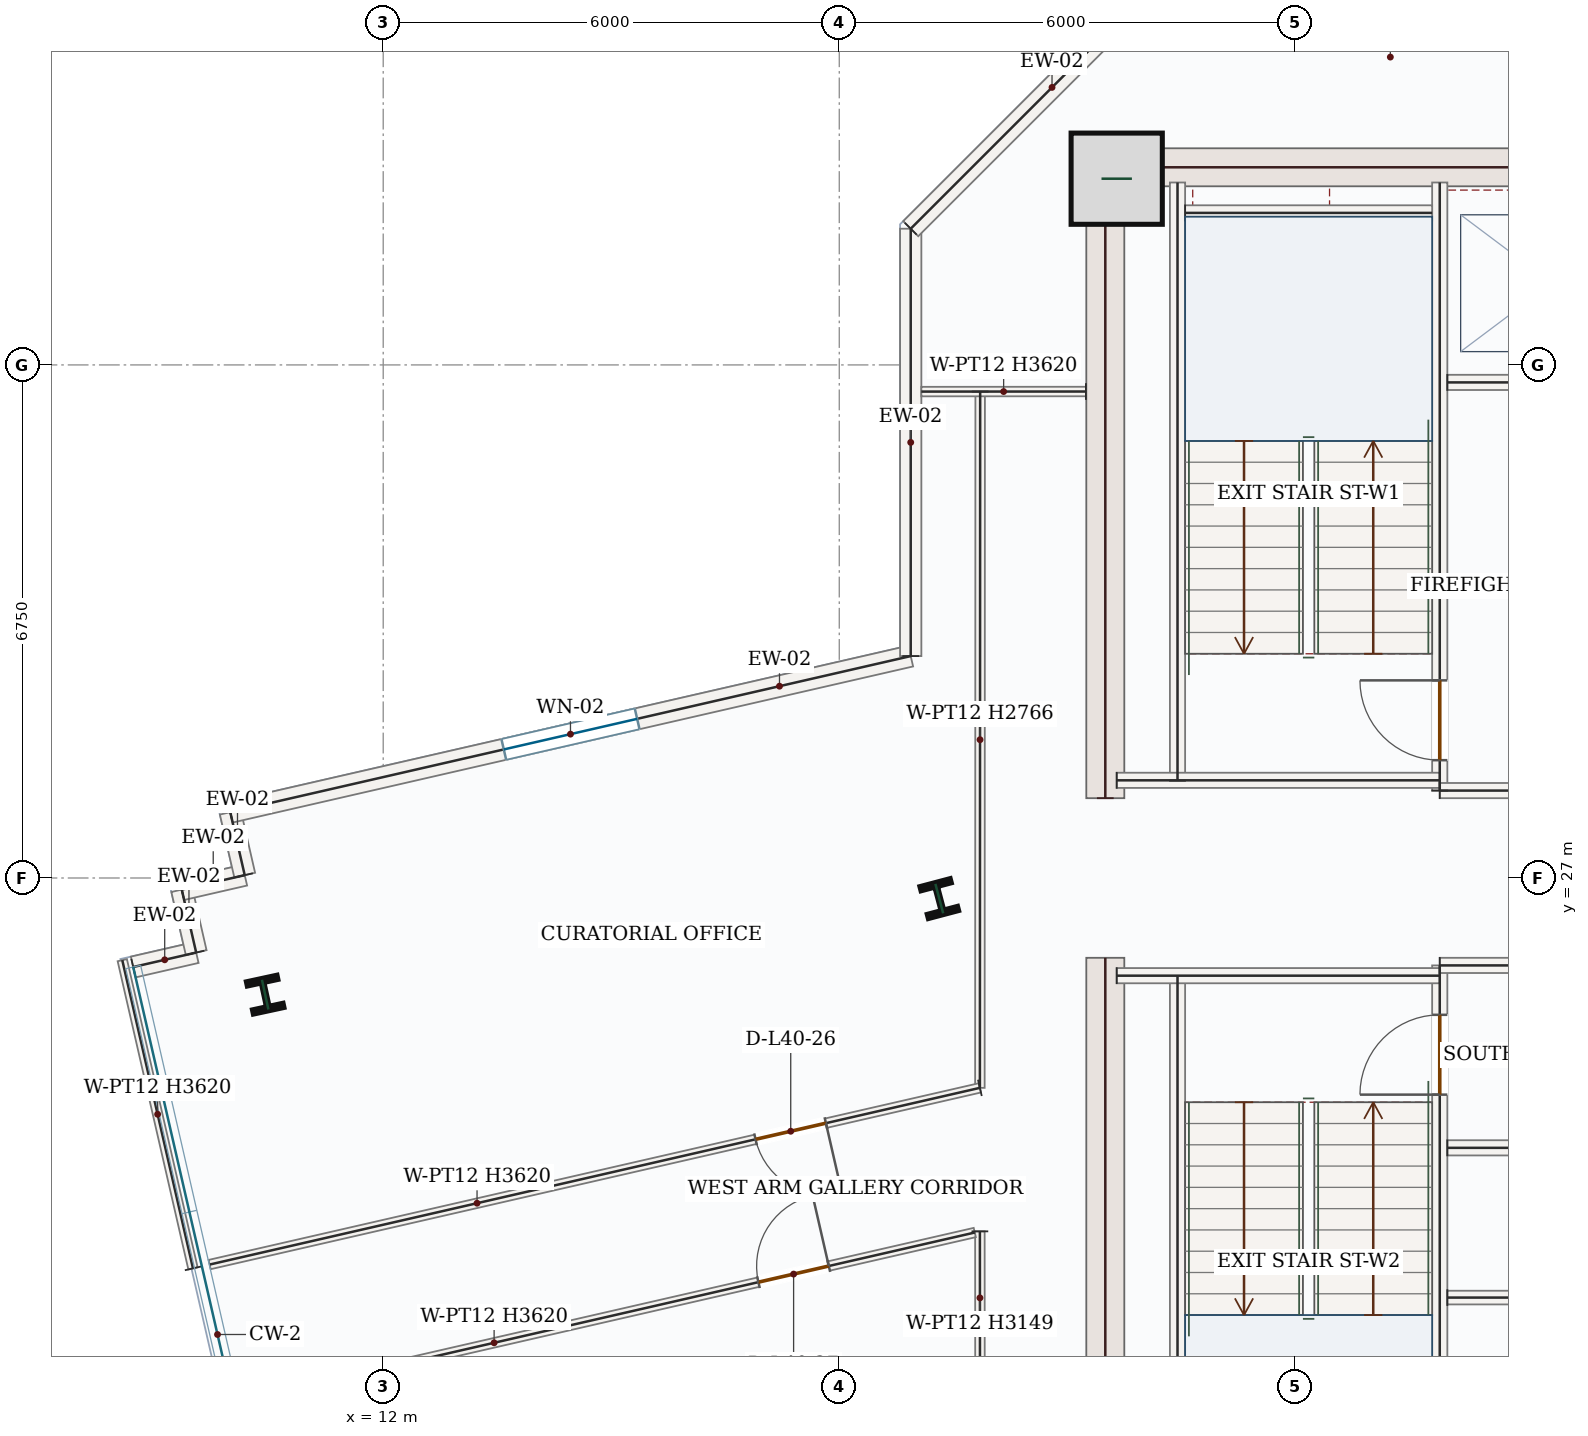
"""IFC4 building model, lengths in metres.
Left out: names, types, materials, properties, quantities, classifications, styles, units other than length and angle.
Written with IfcOpenShell. Run it as: python <this file> out.ifc"""

import sys

from ifc_helpers import new_model, si_unit, direction, frame, frame_2d, origin, origin_2d, place, context, subcontext, project, spatial, rectangle, i_section, extrude, source, transform, mapped, element, fill, save


model = new_model("IFC4")
c1 = context("Model", 3, precision=1e-05, world=origin(), true_north=direction((0.0, 1.0)))
c2 = subcontext(c1, "Body", "Model", "MODEL_VIEW")
j1 = project(units=[si_unit("LENGTHUNIT", "METRE"), si_unit("PLANEANGLEUNIT", "RADIAN")], contexts=[c1])
p1 = place(None, origin())
s1 = spatial("IfcSite", under=j1, at=p1, CompositionType="ELEMENT")
p2 = place(p1, origin())
s2 = spatial("IfcBuilding", under=s1, at=p2, CompositionType="ELEMENT")
p3 = place(p2, frame((0.0, 0.0, 174.6)))
s3 = spatial("IfcBuildingStorey", under=s2, at=p3, CompositionType="ELEMENT", Elevation=174.6)
m1 = source(origin(), c2, "Body", "SweptSolid", [
    extrude(rectangle(XDim=8.55, YDim=0.5, at=frame_2d((4.275, 0.0))), origin(), (0.0, 0.0, 1.0), 3.62),
])
for number, where, z_axis, x_axis in (
    (1, (21.5, 17.4, 0.0), (0.0, 0.0, 1.0), (0.0, 1.0, 0.0)),
    (2, (21.5, 28.05, 0.0), (0.0, 0.0, 1.0), (0.0, 1.0, 0.0)),
):
    element("IfcWall", number, at=place(p3, frame(where, z_axis=z_axis, x_axis=x_axis)), inside=s3, PredefinedType="SHEAR", context=c2, shape_type="MappedRepresentation", body=[
        mapped(m1, transform((0.0, 0.0, 0.0), x_axis=(1.0, 0.0, 0.0), y_axis=(0.0, 1.0, 0.0), z_axis=(0.0, 0.0, 1.0), scale=1.0)),
    ])
m2 = source(origin(), c2, "Body", "SweptSolid", [
    extrude(rectangle(XDim=7.0, YDim=0.5, at=frame_2d((3.5, 0.0))), origin(), (0.0, 0.0, 1.0), 3.62),
])
p4 = place(p3, frame((21.75, 36.35, 0.0), z_axis=(0.0, 0.0, 1.0), x_axis=(1.0, 0.0, 0.0)))
e3 = element("IfcWall", 3, at=p4, inside=s3, PredefinedType="SHEAR", context=c2, shape_type="MappedRepresentation", body=[
    mapped(m2, transform((0.0, 0.0, 0.0), x_axis=(1.0, 0.0, 0.0), y_axis=(0.0, 1.0, 0.0), z_axis=(0.0, 0.0, 1.0), scale=1.0)),
])
m3 = source(origin(), c2, "Body", "SweptSolid", [
    extrude(rectangle(XDim=1.2, YDim=1.2, at=origin_2d()), origin(), (0.0, 0.0, 1.0), 3.9),
])
p5 = place(p3, frame((21.65, 36.2, 0.0), z_axis=(0.0, 0.0, 1.0), x_axis=(1.0, 0.0, 0.0)))
e4 = element("IfcColumn", 4, at=p5, inside=s3, PredefinedType="COLUMN", context=c2, shape_type="MappedRepresentation", body=[
    mapped(m3, transform((0.0, 0.0, 0.0), x_axis=(1.0, 0.0, 0.0), y_axis=(0.0, 1.0, 0.0), z_axis=(0.0, 0.0, 1.0), scale=1.0)),
])
m4 = source(origin(), c2, "Body", "SweptSolid", [
    extrude(i_section(OverallWidth=0.412, OverallDepth=0.435, WebThickness=0.036, FlangeThickness=0.057, FilletRadius=0.018, at=origin_2d()), origin(), (0.0, 0.0, 1.0), 3.9),
])
for number, where, z_axis, x_axis in (
    (5, (19.316, 26.729, 0.0), (0.0, 0.0, 1.0), (0.967, 0.255, 0.0)),
    (6, (10.447, 25.465, 0.0), (0.0, 0.0, 1.0), (0.977, 0.211, 0.0)),
):
    element("IfcColumn", number, at=place(p3, frame(where, z_axis=z_axis, x_axis=x_axis)), inside=s3, PredefinedType="COLUMN", context=c2, shape_type="MappedRepresentation", body=[
        mapped(m4, transform((0.0, 0.0, 0.0), x_axis=(1.0, 0.0, 0.0), y_axis=(0.0, 1.0, 0.0), z_axis=(0.0, 0.0, 1.0), scale=1.0)),
    ])
m5 = source(origin(), c2, "Body", "SweptSolid", [
    extrude(rectangle(XDim=0.85, YDim=0.28, at=frame_2d((0.425, 0.0))), origin(), (0.0, 0.0, 1.0), 3.62),
])
p6 = place(p3, frame((8.711, 25.829, 0.0), z_axis=(0.0, 0.0, 1.0), x_axis=(0.974704946586, 0.223495563939, 0.0)))
e7 = element("IfcWall", 7, at=p6, inside=s3, PredefinedType="SOLIDWALL", context=c2, shape_type="MappedRepresentation", body=[
    mapped(m5, transform((0.0, 0.0, 0.0), x_axis=(1.0, 0.0, 0.0), y_axis=(0.0, 1.0, 0.0), z_axis=(0.0, 0.0, 1.0), scale=1.0)),
])
m6 = source(origin(), c2, "Body", "SweptSolid", [
    extrude(rectangle(XDim=0.85, YDim=0.28, at=frame_2d((0.425, 0.0))), origin(), (0.0, 0.0, 1.0), 3.62),
])
p7 = place(p3, frame((9.539, 26.019, 0.0), z_axis=(0.0, 0.0, 1.0), x_axis=(-0.22316012353, 0.974781800849, 0.0)))
e8 = element("IfcWall", 8, at=p7, inside=s3, PredefinedType="SOLIDWALL", context=c2, shape_type="MappedRepresentation", body=[
    mapped(m6, transform((0.0, 0.0, 0.0), x_axis=(1.0, 0.0, 0.0), y_axis=(0.0, 1.0, 0.0), z_axis=(0.0, 0.0, 1.0), scale=1.0)),
])
for number, where, z_axis, x_axis in (
    (9, (9.35, 26.847, 0.0), (0.0, 0.0, 1.0), (0.975, 0.223, 0.0)),
    (10, (10.178, 27.037, 0.0), (0.0, 0.0, 1.0), (-0.224, 0.975, 0.0)),
):
    element("IfcWall", number, at=place(p3, frame(where, z_axis=z_axis, x_axis=x_axis)), inside=s3, PredefinedType="SOLIDWALL", context=c2, shape_type="MappedRepresentation", body=[
        mapped(m5, transform((0.0, 0.0, 0.0), x_axis=(1.0, 0.0, 0.0), y_axis=(0.0, 1.0, 0.0), z_axis=(0.0, 0.0, 1.0), scale=1.0)),
    ])
p8 = place(p3, frame((9.988, 27.866, 0.0), z_axis=(0.0, 0.0, 1.0), x_axis=(0.974680686557, 0.223601340005, 0.0)))
e11 = element("IfcWall", 11, at=p8, inside=s3, PredefinedType="SOLIDWALL", context=c2, shape_type="SweptSolid", body=[
    extrude(rectangle(XDim=9.185, YDim=0.28, at=frame_2d((4.592, 0.0))), origin(), (0.0, 0.0, 1.0), 3.62),
])
p9 = place(p8, frame((3.692, 0.0, 0.85)))
e12 = element("IfcOpeningElement", 12, at=p9, cuts=e11, PredefinedType="OPENING", context=c2, shape_type="SweptSolid", body=[
    extrude(rectangle(XDim=1.8, YDim=1.75, at=frame_2d((0.9, 0.875))), frame((0.0, 0.15, 0.0), z_axis=(0.0, -1.0, 0.0), x_axis=(1.0, 0.0, 0.0)), (0.0, 0.0, 1.0), 0.3),
])
m7 = source(origin(), c2, "Body", "SweptSolid", [
    extrude(rectangle(XDim=5.623, YDim=0.28, at=frame_2d((2.811, 0.0))), origin(), (0.0, 0.0, 1.0), 3.62),
])
p10 = place(p3, frame((18.94, 29.919, 0.0), z_axis=(0.0, 0.0, 1.0), x_axis=(0.0, 1.0, 0.0)))
e13 = element("IfcWall", 13, at=p10, inside=s3, PredefinedType="SOLIDWALL", context=c2, shape_type="MappedRepresentation", body=[
    mapped(m7, transform((0.0, 0.0, 0.0), x_axis=(1.0, 0.0, 0.0), y_axis=(0.0, 1.0, 0.0), z_axis=(0.0, 0.0, 1.0), scale=1.0)),
])
m8 = source(origin(), c2, "Body", "SweptSolid", [
    extrude(rectangle(XDim=5.258, YDim=0.28, at=frame_2d((2.629, 0.0))), origin(), (0.0, 0.0, 1.0), 3.62),
])
p11 = place(p3, frame((18.94, 35.542, 0.0), z_axis=(0.0, 0.0, 1.0), x_axis=(0.707106781187, 0.707106781187, 0.0)))
e14 = element("IfcWall", 14, at=p11, inside=s3, PredefinedType="SOLIDWALL", context=c2, shape_type="MappedRepresentation", body=[
    mapped(m8, transform((0.0, 0.0, 0.0), x_axis=(1.0, 0.0, 0.0), y_axis=(0.0, 1.0, 0.0), z_axis=(0.0, 0.0, 1.0), scale=1.0)),
])
m9 = source(origin(), c2, "Body", "SweptSolid", [
    extrude(rectangle(XDim=7.87, YDim=0.2, at=frame_2d((3.935, 0.0))), origin(), (0.0, 0.0, 1.0), 3.62),
])
for number, where, z_axis, x_axis in (
    (15, (22.45, 17.85, 0.0), (0.0, 0.0, 1.0), (0.0, 1.0, 0.0)),
    (16, (22.45, 28.28, 0.0), (0.0, 0.0, 1.0), (0.0, 1.0, 0.0)),
):
    element("IfcWall", number, at=place(p3, frame(where, z_axis=z_axis, x_axis=x_axis)), inside=s3, PredefinedType="SOLIDWALL", context=c2, shape_type="MappedRepresentation", body=[
        mapped(m9, transform((0.0, 0.0, 0.0), x_axis=(1.0, 0.0, 0.0), y_axis=(0.0, 1.0, 0.0), z_axis=(0.0, 0.0, 1.0), scale=1.0)),
    ])
p12 = place(p3, frame((25.9, 17.85, 0.0), z_axis=(0.0, 0.0, 1.0), x_axis=(0.0, 1.0, 0.0)))
e17 = element("IfcWall", 17, at=p12, inside=s3, PredefinedType="SOLIDWALL", context=c2, shape_type="SweptSolid", body=[
    extrude(rectangle(XDim=8.0, YDim=0.2, at=frame_2d((4.0, 0.0))), origin(), (0.0, 0.0, 1.0), 3.62),
])
p13 = place(p12, frame((6.3, 0.0, 0.0)))
e18 = element("IfcOpeningElement", 18, at=p13, cuts=e17, PredefinedType="OPENING", context=c2, shape_type="SweptSolid", body=[
    extrude(rectangle(XDim=1.05, YDim=2.15, at=frame_2d((0.525, 1.075))), frame((0.0, 0.11, 0.0), z_axis=(0.0, -1.0, 0.0), x_axis=(1.0, 0.0, 0.0)), (0.0, 0.0, 1.0), 0.22),
])
p14 = place(p3, frame((25.9, 28.15, 0.0), z_axis=(0.0, 0.0, 1.0), x_axis=(0.0, 1.0, 0.0)))
e19 = element("IfcWall", 19, at=p14, inside=s3, PredefinedType="SOLIDWALL", context=c2, shape_type="SweptSolid", body=[
    extrude(rectangle(XDim=8.0, YDim=0.2, at=frame_2d((4.0, 0.0))), origin(), (0.0, 0.0, 1.0), 3.62),
])
p15 = place(p14, frame((0.4, 0.0, 0.0)))
e20 = element("IfcOpeningElement", 20, at=p15, cuts=e19, PredefinedType="OPENING", context=c2, shape_type="SweptSolid", body=[
    extrude(rectangle(XDim=1.05, YDim=2.15, at=frame_2d((0.525, 1.075))), frame((0.0, 0.11, 0.0), z_axis=(0.0, -1.0, 0.0), x_axis=(1.0, 0.0, 0.0)), (0.0, 0.0, 1.0), 0.22),
])
m10 = source(origin(), c2, "Body", "SweptSolid", [
    extrude(rectangle(XDim=4.25, YDim=0.2, at=frame_2d((2.125, 0.0))), origin(), (0.0, 0.0, 1.0), 3.62),
])
p16 = place(p3, frame((21.65, 25.715, 0.0), z_axis=(0.0, 0.0, 1.0), x_axis=(1.0, 0.0, 0.0)))
e21 = element("IfcWall", 21, at=p16, inside=s3, PredefinedType="SOLIDWALL", context=c2, shape_type="MappedRepresentation", body=[
    mapped(m10, transform((0.0, 0.0, 0.0), x_axis=(1.0, 0.0, 0.0), y_axis=(0.0, 1.0, 0.0), z_axis=(0.0, 0.0, 1.0), scale=1.0)),
])
m11 = source(origin(), c2, "Body", "SweptSolid", [
    extrude(rectangle(XDim=3.0, YDim=0.2, at=frame_2d((1.5, 0.0))), origin(), (0.0, 0.0, 1.0), 3.62),
])
p17 = place(p3, frame((25.9, 25.85, 0.0), z_axis=(0.0, 0.0, 1.0), x_axis=(1.0, 0.0, 0.0)))
e22 = element("IfcWall", 22, at=p17, inside=s3, PredefinedType="SOLIDWALL", context=c2, shape_type="MappedRepresentation", body=[
    mapped(m11, transform((0.0, 0.0, 0.0), x_axis=(1.0, 0.0, 0.0), y_axis=(0.0, 1.0, 0.0), z_axis=(0.0, 0.0, 1.0), scale=1.0)),
])
p18 = place(p3, frame((21.65, 28.285, 0.0), z_axis=(0.0, 0.0, 1.0), x_axis=(1.0, 0.0, 0.0)))
e23 = element("IfcWall", 23, at=p18, inside=s3, PredefinedType="SOLIDWALL", context=c2, shape_type="MappedRepresentation", body=[
    mapped(m10, transform((0.0, 0.0, 0.0), x_axis=(1.0, 0.0, 0.0), y_axis=(0.0, 1.0, 0.0), z_axis=(0.0, 0.0, 1.0), scale=1.0)),
])
p19 = place(p3, frame((25.9, 28.15, 0.0), z_axis=(0.0, 0.0, 1.0), x_axis=(1.0, 0.0, 0.0)))
e24 = element("IfcWall", 24, at=p19, inside=s3, PredefinedType="SOLIDWALL", context=c2, shape_type="MappedRepresentation", body=[
    mapped(m11, transform((0.0, 0.0, 0.0), x_axis=(1.0, 0.0, 0.0), y_axis=(0.0, 1.0, 0.0), z_axis=(0.0, 0.0, 1.0), scale=1.0)),
])
m12 = source(origin(), c2, "Body", "SweptSolid", [
    extrude(rectangle(XDim=3.25, YDim=0.2, at=frame_2d((1.625, 0.0))), origin(), (0.0, 0.0, 1.0), 3.62),
])
p20 = place(p3, frame((22.55, 35.75, 0.0), z_axis=(0.0, 0.0, 1.0), x_axis=(1.0, 0.0, 0.0)))
e25 = element("IfcWall", 25, at=p20, inside=s3, PredefinedType="SOLIDWALL", context=c2, shape_type="MappedRepresentation", body=[
    mapped(m12, transform((0.0, 0.0, 0.0), x_axis=(1.0, 0.0, 0.0), y_axis=(0.0, 1.0, 0.0), z_axis=(0.0, 0.0, 1.0), scale=1.0)),
])
p21 = place(p3, frame((26.0, 33.52, 0.0), z_axis=(0.0, 0.0, 1.0), x_axis=(1.0, 0.0, 0.0)))
e26 = element("IfcWall", 26, at=p21, inside=s3, PredefinedType="SOLIDWALL", context=c2, shape_type="SweptSolid", body=[
    extrude(rectangle(XDim=2.75, YDim=0.2, at=frame_2d((1.375, 0.0))), origin(), (0.0, 0.0, 1.0), 3.62),
])
p22 = place(p21, frame((0.82, 0.0, 0.0)))
e27 = element("IfcOpeningElement", 27, at=p22, cuts=e26, PredefinedType="OPENING", context=c2, shape_type="SweptSolid", body=[
    extrude(rectangle(XDim=1.1, YDim=2.15, at=frame_2d((0.55, 1.075))), frame((0.0, 0.11, 0.0), z_axis=(0.0, -1.0, 0.0), x_axis=(1.0, 0.0, 0.0)), (0.0, 0.0, 1.0), 0.22),
])
m13 = source(origin(), c2, "Body", "SweptSolid", [
    extrude(rectangle(XDim=2.75, YDim=0.2, at=frame_2d((1.375, 0.0))), origin(), (0.0, 0.0, 1.0), 3.62),
])
p23 = place(p3, frame((26.0, 23.45, 0.0), z_axis=(0.0, 0.0, 1.0), x_axis=(1.0, 0.0, 0.0)))
e28 = element("IfcWall", 28, at=p23, inside=s3, PredefinedType="SOLIDWALL", context=c2, shape_type="MappedRepresentation", body=[
    mapped(m13, transform((0.0, 0.0, 0.0), x_axis=(1.0, 0.0, 0.0), y_axis=(0.0, 1.0, 0.0), z_axis=(0.0, 0.0, 1.0), scale=1.0)),
])
m14 = source(origin(), c2, "Body", "SweptSolid", [
    extrude(rectangle(XDim=2.75, YDim=0.18, at=frame_2d((1.375, 0.0))), origin(), (0.0, 0.0, 1.0), 3.62),
])
p24 = place(p3, frame((26.0, 21.48, 0.0), z_axis=(0.0, 0.0, 1.0), x_axis=(1.0, 0.0, 0.0)))
e29 = element("IfcWall", 29, at=p24, inside=s3, PredefinedType="PARTITIONING", context=c2, shape_type="MappedRepresentation", body=[
    mapped(m14, transform((0.0, 0.0, 0.0), x_axis=(1.0, 0.0, 0.0), y_axis=(0.0, 1.0, 0.0), z_axis=(0.0, 0.0, 1.0), scale=1.0)),
])
m15 = source(origin(), c2, "Body", "SweptSolid", [
    extrude(rectangle(XDim=9.16, YDim=0.125, at=frame_2d((4.58, 0.0))), origin(), (0.0, 0.0, 1.0), 2.766),
])
p25 = place(p3, frame((19.854, 33.399, 0.0), z_axis=(0.0, 0.0, 1.0), x_axis=(-0.000399776093, -0.99999992009, 0.0)))
e30 = element("IfcWall", 30, at=p25, inside=s3, PredefinedType="PARTITIONING", context=c2, shape_type="MappedRepresentation", body=[
    mapped(m15, transform((0.0, 0.0, 0.0), x_axis=(1.0, 0.0, 0.0), y_axis=(0.0, 1.0, 0.0), z_axis=(0.0, 0.0, 1.0), scale=1.0)),
])
p26 = place(p3, frame((19.85, 24.239, 0.0), z_axis=(0.0, 0.0, 1.0), x_axis=(-0.974685214681, -0.223581600949, 0.0)))
e31 = element("IfcWall", 31, at=p26, inside=s3, PredefinedType="PARTITIONING", context=c2, shape_type="SweptSolid", body=[
    extrude(rectangle(XDim=10.396, YDim=0.125, at=frame_2d((5.198, 0.0))), origin(), (0.0, 0.0, 1.0), 3.62),
])
p27 = place(p26, frame((2.078, 0.0, 0.0)))
e32 = element("IfcOpeningElement", 32, at=p27, cuts=e31, PredefinedType="OPENING", context=c2, shape_type="SweptSolid", body=[
    extrude(rectangle(XDim=0.95, YDim=2.15, at=frame_2d((0.475, 1.075))), frame((0.0, 0.073, 0.0), z_axis=(0.0, -1.0, 0.0), x_axis=(1.0, 0.0, 0.0)), (0.0, 0.0, 1.0), 0.145),
])
m16 = source(origin(), c2, "Body", "SweptSolid", [
    extrude(rectangle(XDim=4.16, YDim=0.125, at=frame_2d((2.08, 0.0))), origin(), (0.0, 0.0, 1.0), 3.62),
])
p28 = place(p3, frame((9.497, 21.864, 0.0), z_axis=(0.0, 0.0, 1.0), x_axis=(-0.223599186995, 0.974681180477, 0.0)))
e33 = element("IfcWall", 33, at=p28, inside=s3, PredefinedType="PARTITIONING", context=c2, shape_type="MappedRepresentation", body=[
    mapped(m16, transform((0.0, 0.0, 0.0), x_axis=(1.0, 0.0, 0.0), y_axis=(0.0, 1.0, 0.0), z_axis=(0.0, 0.0, 1.0), scale=1.0)),
])
m17 = source(origin(), c2, "Body", "SweptSolid", [
    extrude(rectangle(XDim=2.165, YDim=0.125, at=frame_2d((1.083, 0.0))), origin(), (0.0, 0.0, 1.0), 3.62),
])
p29 = place(p3, frame((21.245, 33.4, 0.0), z_axis=(0.0, 0.0, 1.0), x_axis=(-0.999999942778, -0.000338294974, 0.0)))
e34 = element("IfcWall", 34, at=p29, inside=s3, PredefinedType="PARTITIONING", context=c2, shape_type="MappedRepresentation", body=[
    mapped(m17, transform((0.0, 0.0, 0.0), x_axis=(1.0, 0.0, 0.0), y_axis=(0.0, 1.0, 0.0), z_axis=(0.0, 0.0, 1.0), scale=1.0)),
])
m18 = source(origin(), c2, "Body", "SweptSolid", [
    extrude(rectangle(XDim=1.75, YDim=0.125, at=frame_2d((0.875, 0.0))), origin(), (0.0, 0.0, 1.0), 3.149),
])
p30 = place(p3, frame((19.85, 22.351, 0.0), z_axis=(0.0, 0.0, 1.0), x_axis=(0.000557957787, -0.999999844342, 0.0)))
e35 = element("IfcWall", 35, at=p30, inside=s3, PredefinedType="PARTITIONING", context=c2, shape_type="MappedRepresentation", body=[
    mapped(m18, transform((0.0, 0.0, 0.0), x_axis=(1.0, 0.0, 0.0), y_axis=(0.0, 1.0, 0.0), z_axis=(0.0, 0.0, 1.0), scale=1.0)),
])
p31 = place(p3, frame((10.128, 20.121, 0.0), z_axis=(0.0, 0.0, 1.0), x_axis=(0.974684890892, 0.223583012474, 0.0)))
e36 = element("IfcWall", 36, at=p31, inside=s3, PredefinedType="PARTITIONING", context=c2, shape_type="SweptSolid", body=[
    extrude(rectangle(XDim=9.905, YDim=0.125, at=frame_2d((4.953, 0.0))), origin(), (0.0, 0.0, 1.0), 3.62),
])
p32 = place(p31, frame((6.985, 0.0, 0.0)))
e37 = element("IfcOpeningElement", 37, at=p32, cuts=e36, PredefinedType="OPENING", context=c2, shape_type="SweptSolid", body=[
    extrude(rectangle(XDim=0.95, YDim=2.15, at=frame_2d((0.475, 1.075))), frame((0.0, 0.073, 0.0), z_axis=(0.0, -1.0, 0.0), x_axis=(1.0, 0.0, 0.0)), (0.0, 0.0, 1.0), 0.145),
])
m19 = source(origin(), c2, "Body", "SweptSolid", [
    extrude(rectangle(XDim=1.8, YDim=1.75, at=frame_2d((0.9, 0.875))), frame((0.0, 0.03, 0.0), z_axis=(0.0, -1.0, 0.0), x_axis=(1.0, 0.0, 0.0)), (0.0, 0.0, 1.0), 0.06),
])
p33 = place(p9, origin())
e38 = element("IfcWindow", 38, at=p33, inside=s3, PartitioningType="DOUBLE_PANEL_VERTICAL", PredefinedType="WINDOW", context=c2, shape_type="MappedRepresentation", body=[
    mapped(m19, transform((0.0, 0.0, 0.0), x_axis=(1.0, 0.0, 0.0), y_axis=(0.0, 1.0, 0.0), z_axis=(0.0, 0.0, 1.0), scale=1.0)),
])
fill(e12, e38)
m20 = source(origin(), c2, "Body", "SweptSolid", [
    extrude(rectangle(XDim=1.05, YDim=2.15, at=frame_2d((0.525, 1.075))), frame((0.0, 0.025, 0.0), z_axis=(0.0, -1.0, 0.0), x_axis=(1.0, 0.0, 0.0)), (0.0, 0.0, 1.0), 0.05),
])
p34 = place(p15, origin())
e39 = element("IfcDoor", 39, at=p34, inside=s3, OperationType="SINGLE_SWING_RIGHT", PredefinedType="DOOR", context=c2, shape_type="MappedRepresentation", body=[
    mapped(m20, transform((0.0, 0.0, 0.0), x_axis=(1.0, 0.0, 0.0), y_axis=(0.0, 1.0, 0.0), z_axis=(0.0, 0.0, 1.0), scale=1.0)),
])
fill(e20, e39)
p35 = place(p13, origin())
e40 = element("IfcDoor", 40, at=p35, inside=s3, OperationType="SINGLE_SWING_LEFT", PredefinedType="DOOR", context=c2, shape_type="MappedRepresentation", body=[
    mapped(m20, transform((0.0, 0.0, 0.0), x_axis=(1.0, 0.0, 0.0), y_axis=(0.0, 1.0, 0.0), z_axis=(0.0, 0.0, 1.0), scale=1.0)),
])
fill(e18, e40)
m21 = source(origin(), c2, "Body", "SweptSolid", [
    extrude(rectangle(XDim=0.95, YDim=2.15, at=frame_2d((0.475, 1.075))), frame((0.0, 0.025, 0.0), z_axis=(0.0, -1.0, 0.0), x_axis=(1.0, 0.0, 0.0)), (0.0, 0.0, 1.0), 0.05),
])
p36 = place(p27, origin())
e41 = element("IfcDoor", 41, at=p36, inside=s3, OperationType="SINGLE_SWING_LEFT", PredefinedType="DOOR", context=c2, shape_type="MappedRepresentation", body=[
    mapped(m21, transform((0.0, 0.0, 0.0), x_axis=(1.0, 0.0, 0.0), y_axis=(0.0, 1.0, 0.0), z_axis=(0.0, 0.0, 1.0), scale=1.0)),
])
fill(e32, e41)
p37 = place(p32, origin())
e42 = element("IfcDoor", 42, at=p37, inside=s3, OperationType="SINGLE_SWING_RIGHT", PredefinedType="DOOR", context=c2, shape_type="MappedRepresentation", body=[
    mapped(m21, transform((0.0, 0.0, 0.0), x_axis=(1.0, 0.0, 0.0), y_axis=(0.0, 1.0, 0.0), z_axis=(0.0, 0.0, 1.0), scale=1.0)),
])
fill(e37, e42)
save(model, sys.argv[1])
